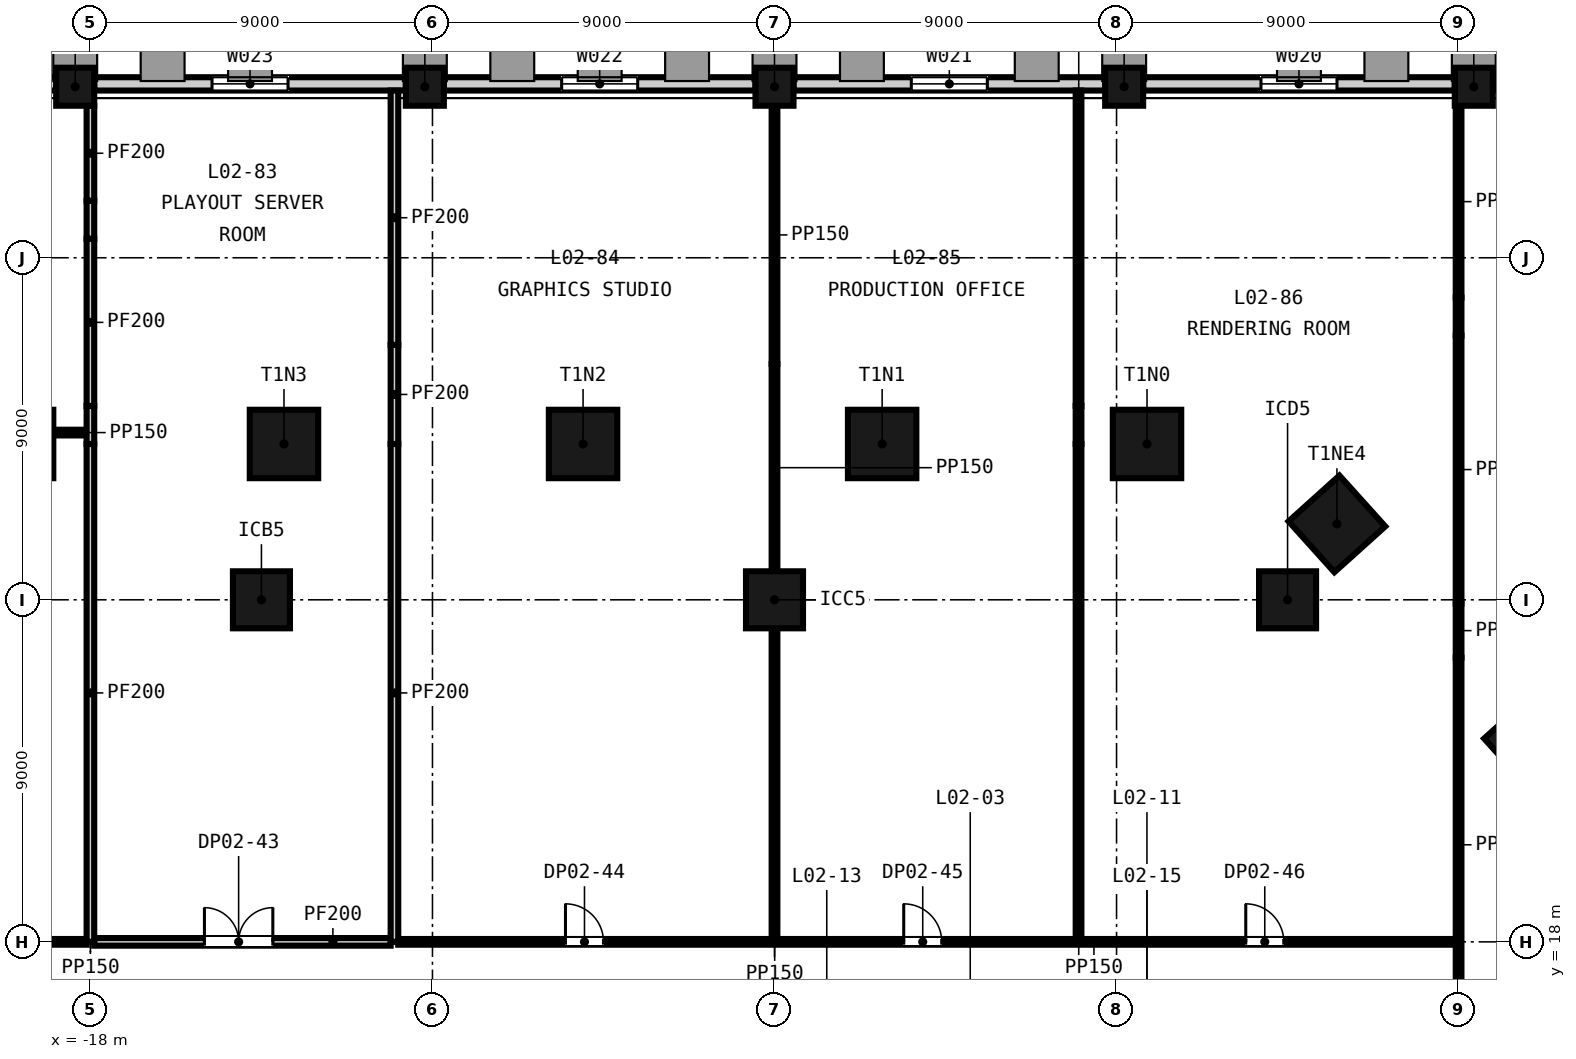
"""IFC4 building model, lengths in metres.
Left out: names, types, materials, properties, quantities, classifications, styles, units other than length and angle.
Written with IfcOpenShell. Run it as: python <this file> out.ifc"""

import sys

from ifc_helpers import new_model, si_unit, direction, frame, frame_2d, origin, origin_2d, place, context, subcontext, project, spatial, rectangle, extrude, element, fill, save


model = new_model("IFC4")
c1 = context("Model", 3, precision=1e-05, world=origin(), true_north=direction((0.0, 1.0)))
c2 = subcontext(c1, "Body", "Model", "MODEL_VIEW")
j1 = project(units=[si_unit("LENGTHUNIT", "METRE"), si_unit("PLANEANGLEUNIT", "RADIAN")], contexts=[c1])
p1 = place(None, origin())
s1 = spatial("IfcSite", under=j1, at=p1, CompositionType="ELEMENT")
p2 = place(p1, origin())
s2 = spatial("IfcBuilding", under=s1, at=p2, CompositionType="ELEMENT")
p3 = place(p2, frame((0.0, 0.0, 18.0)))
s3 = spatial("IfcBuildingStorey", under=s2, at=p3, CompositionType="ELEMENT", Elevation=18.0)
for number, where, z_axis, x_axis in (
    (1, (9.802, 31.1, -0.4), (0.0, 0.0, 1.0), (-1.0, 0.0, 0.0)),
    (2, (2.832, 31.1, -0.4), (0.0, 0.0, 1.0), (-1.0, 0.0, 0.0)),
    (3, (-5.037, 31.1, -0.4), (0.0, 0.0, 1.0), (-1.0, 0.0, 0.0)),
    (4, (-12.907, 31.1, -0.4), (0.0, 0.0, 1.0), (-1.0, 0.0, 0.0)),
    (5, (-19.876, 31.1, -0.4), (0.0, 0.0, 1.0), (-1.0, 0.0, 0.0)),
    (6, (19.944, 23.283, -0.4), (0.0, 0.0, 1.0), (-0.669, 0.743, 0.0)),
    (7, (14.799, 28.998, -0.4), (0.0, 0.0, 1.0), (-0.669, 0.743, 0.0)),
):
    element("IfcColumn", number, at=place(p3, frame(where, z_axis=z_axis, x_axis=x_axis)), inside=s3, PredefinedType="COLUMN", context=c2, shape_type="SweptSolid", body=[
        extrude(rectangle(XDim=1.8, YDim=1.8, at=origin_2d()), origin(), (0.0, 0.0, 1.0), 4.6),
    ])
for number, where, z_axis, x_axis in (
    (8, (-13.5, 27.0, -0.4), (0.0, 0.0, 1.0), (1.0, 0.0, 0.0)),
    (9, (0.0, 27.0, -0.4), (0.0, 0.0, 1.0), (1.0, 0.0, 0.0)),
    (10, (13.5, 27.0, -0.4), (0.0, 0.0, 1.0), (1.0, 0.0, 0.0)),
):
    element("IfcColumn", number, at=place(p3, frame(where, z_axis=z_axis, x_axis=x_axis)), inside=s3, PredefinedType="COLUMN", context=c2, shape_type="SweptSolid", body=[
        extrude(rectangle(XDim=1.5, YDim=1.5, at=origin_2d()), origin(), (0.0, 0.0, 1.0), 4.6),
    ])
for number, where, z_axis, x_axis in (
    (11, (18.4, 40.5, -0.4), (0.0, 0.0, 1.0), (-1.0, 0.0, 0.0)),
    (12, (9.2, 40.5, -0.4), (0.0, 0.0, 1.0), (-1.0, 0.0, 0.0)),
    (13, (0.0, 40.5, -0.4), (0.0, 0.0, 1.0), (-1.0, 0.0, 0.0)),
    (14, (-9.2, 40.5, -0.4), (0.0, 0.0, 1.0), (-1.0, 0.0, 0.0)),
    (15, (-18.4, 40.5, -0.4), (0.0, 0.0, 1.0), (-1.0, 0.0, 0.0)),
):
    element("IfcColumn", number, at=place(p3, frame(where, z_axis=z_axis, x_axis=x_axis)), inside=s3, PredefinedType="COLUMN", context=c2, shape_type="SweptSolid", body=[
        extrude(rectangle(XDim=1.0, YDim=1.0, at=origin_2d()), origin(), (0.0, 0.0, 1.0), 4.6),
    ])
p4 = place(p3, frame((27.1, 40.575, -0.4), z_axis=(0.0, 0.0, 1.0), x_axis=(-1.0, 0.0, 0.0)))
e16 = element("IfcWall", 16, at=p4, inside=s3, PredefinedType="SOLIDWALL", context=c2, shape_type="SweptSolid", body=[
    extrude(rectangle(XDim=8.2, YDim=0.35, at=frame_2d((4.1, 0.0))), origin(), (0.0, 0.0, 1.0), 3.7),
])
p5 = place(p4, frame((3.1, 0.0, 1.3)))
e17 = element("IfcOpeningElement", 17, at=p5, cuts=e16, PredefinedType="OPENING", context=c2, shape_type="SweptSolid", body=[
    extrude(rectangle(XDim=2.0, YDim=2.35, at=frame_2d((1.0, 1.175))), frame((0.0, 0.185, 0.0), z_axis=(0.0, -1.0, 0.0), x_axis=(1.0, 0.0, 0.0)), (0.0, 0.0, 1.0), 0.37),
])
p6 = place(p3, frame((17.9, 40.575, -0.4), z_axis=(0.0, 0.0, 1.0), x_axis=(-1.0, 0.0, 0.0)))
e18 = element("IfcWall", 18, at=p6, inside=s3, PredefinedType="SOLIDWALL", context=c2, shape_type="SweptSolid", body=[
    extrude(rectangle(XDim=8.2, YDim=0.35, at=frame_2d((4.1, 0.0))), origin(), (0.0, 0.0, 1.0), 3.7),
])
p7 = place(p6, frame((3.1, 0.0, 1.3)))
e19 = element("IfcOpeningElement", 19, at=p7, cuts=e18, PredefinedType="OPENING", context=c2, shape_type="SweptSolid", body=[
    extrude(rectangle(XDim=2.0, YDim=2.35, at=frame_2d((1.0, 1.175))), frame((0.0, 0.185, 0.0), z_axis=(0.0, -1.0, 0.0), x_axis=(1.0, 0.0, 0.0)), (0.0, 0.0, 1.0), 0.37),
])
p8 = place(p3, frame((8.7, 40.575, -0.4), z_axis=(0.0, 0.0, 1.0), x_axis=(-1.0, 0.0, 0.0)))
e20 = element("IfcWall", 20, at=p8, inside=s3, PredefinedType="SOLIDWALL", context=c2, shape_type="SweptSolid", body=[
    extrude(rectangle(XDim=8.2, YDim=0.35, at=frame_2d((4.1, 0.0))), origin(), (0.0, 0.0, 1.0), 3.7),
])
p9 = place(p8, frame((3.1, 0.0, 1.3)))
e21 = element("IfcOpeningElement", 21, at=p9, cuts=e20, PredefinedType="OPENING", context=c2, shape_type="SweptSolid", body=[
    extrude(rectangle(XDim=2.0, YDim=2.35, at=frame_2d((1.0, 1.175))), frame((0.0, 0.185, 0.0), z_axis=(0.0, -1.0, 0.0), x_axis=(1.0, 0.0, 0.0)), (0.0, 0.0, 1.0), 0.37),
])
p10 = place(p3, frame((-0.5, 40.575, -0.4), z_axis=(0.0, 0.0, 1.0), x_axis=(-1.0, 0.0, 0.0)))
e22 = element("IfcWall", 22, at=p10, inside=s3, PredefinedType="SOLIDWALL", context=c2, shape_type="SweptSolid", body=[
    extrude(rectangle(XDim=8.2, YDim=0.35, at=frame_2d((4.1, 0.0))), origin(), (0.0, 0.0, 1.0), 3.7),
])
p11 = place(p10, frame((3.1, 0.0, 1.3)))
e23 = element("IfcOpeningElement", 23, at=p11, cuts=e22, PredefinedType="OPENING", context=c2, shape_type="SweptSolid", body=[
    extrude(rectangle(XDim=2.0, YDim=2.35, at=frame_2d((1.0, 1.175))), frame((0.0, 0.185, 0.0), z_axis=(0.0, -1.0, 0.0), x_axis=(1.0, 0.0, 0.0)), (0.0, 0.0, 1.0), 0.37),
])
p12 = place(p3, frame((-9.7, 40.575, -0.4), z_axis=(0.0, 0.0, 1.0), x_axis=(-1.0, 0.0, 0.0)))
e24 = element("IfcWall", 24, at=p12, inside=s3, PredefinedType="SOLIDWALL", context=c2, shape_type="SweptSolid", body=[
    extrude(rectangle(XDim=8.2, YDim=0.35, at=frame_2d((4.1, 0.0))), origin(), (0.0, 0.0, 1.0), 3.7),
])
p13 = place(p12, frame((3.1, 0.0, 1.3)))
e25 = element("IfcOpeningElement", 25, at=p13, cuts=e24, PredefinedType="OPENING", context=c2, shape_type="SweptSolid", body=[
    extrude(rectangle(XDim=2.0, YDim=2.35, at=frame_2d((1.0, 1.175))), frame((0.0, 0.185, 0.0), z_axis=(0.0, -1.0, 0.0), x_axis=(1.0, 0.0, 0.0)), (0.0, 0.0, 1.0), 0.37),
])
p14 = place(p3, frame((-18.9, 40.575, -0.4), z_axis=(0.0, 0.0, 1.0), x_axis=(-1.0, 0.0, 0.0)))
e26 = element("IfcWall", 26, at=p14, inside=s3, PredefinedType="SOLIDWALL", context=c2, shape_type="SweptSolid", body=[
    extrude(rectangle(XDim=8.2, YDim=0.35, at=frame_2d((4.1, 0.0))), origin(), (0.0, 0.0, 1.0), 3.7),
])
p15 = place(p14, frame((3.1, 0.0, 1.3)))
e27 = element("IfcOpeningElement", 27, at=p15, cuts=e26, PredefinedType="OPENING", context=c2, shape_type="SweptSolid", body=[
    extrude(rectangle(XDim=2.0, YDim=2.35, at=frame_2d((1.0, 1.175))), frame((0.0, 0.185, 0.0), z_axis=(0.0, -1.0, 0.0), x_axis=(1.0, 0.0, 0.0)), (0.0, 0.0, 1.0), 0.37),
])
p16 = place(p3, frame((-26.142, 18.0, 0.0), z_axis=(0.0, 0.0, 1.0), x_axis=(1.0, 0.0, 0.0)))
e28 = element("IfcWall", 28, at=p16, inside=s3, PredefinedType="PARTITIONING", context=c2, shape_type="SweptSolid", body=[
    extrude(rectangle(XDim=8.042, YDim=0.15, at=frame_2d((4.021, 0.0))), origin(), (0.0, 0.0, 1.0), 4.2),
])
p17 = place(p3, frame((-17.9, 18.0, 0.0), z_axis=(0.0, 0.0, 1.0), x_axis=(1.0, 0.0, 0.0)))
e29 = element("IfcWall", 29, at=p17, inside=s3, PredefinedType="PARTITIONING", context=c2, shape_type="SweptSolid", body=[
    extrude(rectangle(XDim=7.8, YDim=0.2, at=frame_2d((3.9, 0.0))), origin(), (0.0, 0.0, 1.0), 4.2),
])
p18 = place(p17, frame((2.9, 0.0, 0.0)))
e30 = element("IfcOpeningElement", 30, at=p18, cuts=e29, PredefinedType="OPENING", context=c2, shape_type="SweptSolid", body=[
    extrude(rectangle(XDim=1.8, YDim=2.4, at=frame_2d((0.9, 1.2))), frame((0.0, 0.11, 0.0), z_axis=(0.0, -1.0, 0.0), x_axis=(1.0, 0.0, 0.0)), (0.0, 0.0, 1.0), 0.22),
])
p19 = place(p3, frame((-9.9, 18.0, 0.0), z_axis=(0.0, 0.0, 1.0), x_axis=(1.0, 0.0, 0.0)))
e31 = element("IfcWall", 31, at=p19, inside=s3, PredefinedType="PARTITIONING", context=c2, shape_type="SweptSolid", body=[
    extrude(rectangle(XDim=27.825, YDim=0.15, at=frame_2d((13.913, 0.0))), origin(), (0.0, 0.0, 1.0), 4.2),
])
p20 = place(p19, frame((4.4, 0.0, 0.0)))
e32 = element("IfcOpeningElement", 32, at=p20, cuts=e31, PredefinedType="OPENING", context=c2, shape_type="SweptSolid", body=[
    extrude(rectangle(XDim=1.0, YDim=2.1, at=frame_2d((0.5, 1.05))), frame((0.0, 0.085, 0.0), z_axis=(0.0, -1.0, 0.0), x_axis=(1.0, 0.0, 0.0)), (0.0, 0.0, 1.0), 0.17),
])
p21 = place(p19, frame((13.3, 0.0, 0.0)))
e33 = element("IfcOpeningElement", 33, at=p21, cuts=e31, PredefinedType="OPENING", context=c2, shape_type="SweptSolid", body=[
    extrude(rectangle(XDim=1.0, YDim=2.1, at=frame_2d((0.5, 1.05))), frame((0.0, 0.085, 0.0), z_axis=(0.0, -1.0, 0.0), x_axis=(1.0, 0.0, 0.0)), (0.0, 0.0, 1.0), 0.17),
])
p22 = place(p19, frame((22.3, 0.0, 0.0)))
e34 = element("IfcOpeningElement", 34, at=p22, cuts=e31, PredefinedType="OPENING", context=c2, shape_type="SweptSolid", body=[
    extrude(rectangle(XDim=1.0, YDim=2.1, at=frame_2d((0.5, 1.05))), frame((0.0, 0.085, 0.0), z_axis=(0.0, -1.0, 0.0), x_axis=(1.0, 0.0, 0.0)), (0.0, 0.0, 1.0), 0.17),
])
p23 = place(p3, frame((-18.976, 31.4, 0.0), z_axis=(0.0, 0.0, 1.0), x_axis=(1.0, 0.0, 0.0)))
e35 = element("IfcWall", 35, at=p23, inside=s3, PredefinedType="PARTITIONING", context=c2, shape_type="SweptSolid", body=[
    extrude(rectangle(XDim=0.876, YDim=0.15, at=frame_2d((0.438, 0.0))), origin(), (0.0, 0.0, 1.0), 3.2),
])
p24 = place(p3, frame((-18.0, 18.0, 0.0), z_axis=(0.0, 0.0, 1.0), x_axis=(0.0, 1.0, 0.0)))
e36 = element("IfcWall", 36, at=p24, inside=s3, PredefinedType="PARTITIONING", context=c2, shape_type="SweptSolid", body=[
    extrude(rectangle(XDim=13.1, YDim=0.2, at=frame_2d((6.55, 0.0))), origin(), (0.0, 0.0, 1.0), 4.2),
])
p25 = place(p3, frame((-18.0, 31.1, 0.0), z_axis=(0.0, 0.0, 1.0), x_axis=(0.0, 1.0, 0.0)))
e37 = element("IfcWall", 37, at=p25, inside=s3, PredefinedType="PARTITIONING", context=c2, shape_type="SweptSolid", body=[
    extrude(rectangle(XDim=1.0, YDim=0.2, at=frame_2d((0.5, 0.0))), origin(), (0.0, 0.0, 1.0), 3.2),
])
p26 = place(p3, frame((-18.0, 32.1, 0.0), z_axis=(0.0, 0.0, 1.0), x_axis=(0.0, 1.0, 0.0)))
e38 = element("IfcWall", 38, at=p26, inside=s3, PredefinedType="PARTITIONING", context=c2, shape_type="SweptSolid", body=[
    extrude(rectangle(XDim=4.4, YDim=0.2, at=frame_2d((2.2, 0.0))), origin(), (0.0, 0.0, 1.0), 4.2),
])
p27 = place(p3, frame((-18.0, 36.5, 0.0), z_axis=(0.0, 0.0, 1.0), x_axis=(0.0, 1.0, 0.0)))
e39 = element("IfcWall", 39, at=p27, inside=s3, PredefinedType="PARTITIONING", context=c2, shape_type="SweptSolid", body=[
    extrude(rectangle(XDim=1.0, YDim=0.2, at=frame_2d((0.5, 0.0))), origin(), (0.0, 0.0, 1.0), 3.597),
])
p28 = place(p3, frame((-18.0, 37.5, 0.0), z_axis=(0.0, 0.0, 1.0), x_axis=(0.0, 1.0, 0.0)))
e40 = element("IfcWall", 40, at=p28, inside=s3, PredefinedType="PARTITIONING", context=c2, shape_type="SweptSolid", body=[
    extrude(rectangle(XDim=2.5, YDim=0.2, at=frame_2d((1.25, 0.0))), origin(), (0.0, 0.0, 1.0), 4.2),
])
p29 = place(p3, frame((-10.0, 18.0, 0.0), z_axis=(0.0, 0.0, 1.0), x_axis=(0.0, 1.0, 0.0)))
e41 = element("IfcWall", 41, at=p29, inside=s3, PredefinedType="PARTITIONING", context=c2, shape_type="SweptSolid", body=[
    extrude(rectangle(XDim=13.1, YDim=0.2, at=frame_2d((6.55, 0.0))), origin(), (0.0, 0.0, 1.0), 4.2),
])
p30 = place(p3, frame((-10.0, 31.1, 0.0), z_axis=(0.0, 0.0, 1.0), x_axis=(0.0, 1.0, 0.0)))
e42 = element("IfcWall", 42, at=p30, inside=s3, PredefinedType="PARTITIONING", context=c2, shape_type="SweptSolid", body=[
    extrude(rectangle(XDim=2.606, YDim=0.2, at=frame_2d((1.303, 0.0))), origin(), (0.0, 0.0, 1.0), 3.2),
])
p31 = place(p3, frame((-10.0, 33.707, 0.0), z_axis=(0.0, 0.0, 1.0), x_axis=(0.0, 1.0, 0.0)))
e43 = element("IfcWall", 43, at=p31, inside=s3, PredefinedType="PARTITIONING", context=c2, shape_type="SweptSolid", body=[
    extrude(rectangle(XDim=6.693, YDim=0.2, at=frame_2d((3.347, 0.0))), origin(), (0.0, 0.0, 1.0), 4.2),
])
p32 = place(p3, frame((0.0, 18.075, 0.0), z_axis=(0.0, 0.0, 1.0), x_axis=(0.0, 1.0, 0.0)))
e44 = element("IfcWall", 44, at=p32, inside=s3, PredefinedType="PARTITIONING", context=c2, shape_type="SweptSolid", body=[
    extrude(rectangle(XDim=8.175, YDim=0.15, at=frame_2d((4.087, 0.0))), origin(), (0.0, 0.0, 1.0), 3.521),
])
p33 = place(p3, frame((0.0, 27.75, 0.0), z_axis=(0.0, 0.0, 1.0), x_axis=(0.0, 1.0, 0.0)))
e45 = element("IfcWall", 45, at=p33, inside=s3, PredefinedType="PARTITIONING", context=c2, shape_type="SweptSolid", body=[
    extrude(rectangle(XDim=5.453, YDim=0.15, at=frame_2d((2.727, 0.0))), origin(), (0.0, 0.0, 1.0), 3.2),
])
p34 = place(p3, frame((0.0, 33.203, 0.0), z_axis=(0.0, 0.0, 1.0), x_axis=(0.0, 1.0, 0.0)))
e46 = element("IfcWall", 46, at=p34, inside=s3, PredefinedType="PARTITIONING", context=c2, shape_type="SweptSolid", body=[
    extrude(rectangle(XDim=6.797, YDim=0.15, at=frame_2d((3.398, 0.0))), origin(), (0.0, 0.0, 1.0), 4.2),
])
p35 = place(p3, frame((8.0, 18.075, 0.0), z_axis=(0.0, 0.0, 1.0), x_axis=(0.0, 1.0, 0.0)))
e47 = element("IfcWall", 47, at=p35, inside=s3, PredefinedType="PARTITIONING", context=c2, shape_type="SweptSolid", body=[
    extrude(rectangle(XDim=13.025, YDim=0.15, at=frame_2d((6.513, 0.0))), origin(), (0.0, 0.0, 1.0), 4.2),
])
p36 = place(p3, frame((8.0, 31.1, 0.0), z_axis=(0.0, 0.0, 1.0), x_axis=(0.0, 1.0, 0.0)))
e48 = element("IfcWall", 48, at=p36, inside=s3, PredefinedType="PARTITIONING", context=c2, shape_type="SweptSolid", body=[
    extrude(rectangle(XDim=1.0, YDim=0.15, at=frame_2d((0.5, 0.0))), origin(), (0.0, 0.0, 1.0), 3.2),
])
p37 = place(p3, frame((8.0, 32.1, 0.0), z_axis=(0.0, 0.0, 1.0), x_axis=(0.0, 1.0, 0.0)))
e49 = element("IfcWall", 49, at=p37, inside=s3, PredefinedType="PARTITIONING", context=c2, shape_type="SweptSolid", body=[
    extrude(rectangle(XDim=8.3, YDim=0.15, at=frame_2d((4.15, 0.0))), origin(), (0.0, 0.0, 1.0), 4.2),
])
p38 = place(p3, frame((18.0, 15.629, 0.0), z_axis=(0.0, 0.0, 1.0), x_axis=(0.0, 1.0, 0.0)))
e50 = element("IfcWall", 50, at=p38, inside=s3, PredefinedType="PARTITIONING", context=c2, shape_type="SweptSolid", body=[
    extrude(rectangle(XDim=9.85, YDim=0.15, at=frame_2d((4.925, 0.0))), origin(), (0.0, 0.0, 1.0), 4.2),
])
p39 = place(p3, frame((18.0, 25.479, 0.0), z_axis=(0.0, 0.0, 1.0), x_axis=(0.0, 1.0, 0.0)))
e51 = element("IfcWall", 51, at=p39, inside=s3, PredefinedType="PARTITIONING", context=c2, shape_type="SweptSolid", body=[
    extrude(rectangle(XDim=1.42, YDim=0.15, at=frame_2d((0.71, 0.0))), origin(), (0.0, 0.0, 1.0), 3.2),
])
p40 = place(p3, frame((18.0, 26.899, 0.0), z_axis=(0.0, 0.0, 1.0), x_axis=(0.0, 1.0, 0.0)))
e52 = element("IfcWall", 52, at=p40, inside=s3, PredefinedType="PARTITIONING", context=c2, shape_type="SweptSolid", body=[
    extrude(rectangle(XDim=7.055, YDim=0.15, at=frame_2d((3.528, 0.0))), origin(), (0.0, 0.0, 1.0), 4.2),
])
p41 = place(p3, frame((18.0, 33.955, 0.0), z_axis=(0.0, 0.0, 1.0), x_axis=(0.0, 1.0, 0.0)))
e53 = element("IfcWall", 53, at=p41, inside=s3, PredefinedType="PARTITIONING", context=c2, shape_type="SweptSolid", body=[
    extrude(rectangle(XDim=1.0, YDim=0.15, at=frame_2d((0.5, 0.0))), origin(), (0.0, 0.0, 1.0), 3.451),
])
p42 = place(p3, frame((18.0, 34.955, 0.0), z_axis=(0.0, 0.0, 1.0), x_axis=(0.0, 1.0, 0.0)))
e54 = element("IfcWall", 54, at=p42, inside=s3, PredefinedType="PARTITIONING", context=c2, shape_type="SweptSolid", body=[
    extrude(rectangle(XDim=5.045, YDim=0.15, at=frame_2d((2.523, 0.0))), origin(), (0.0, 0.0, 1.0), 4.2),
])
p43 = place(p7, origin())
e55 = element("IfcWindow", 55, at=p43, inside=s3, PartitioningType="SINGLE_PANEL", PredefinedType="WINDOW", context=c2, shape_type="SweptSolid", body=[
    extrude(rectangle(XDim=2.0, YDim=2.35, at=frame_2d((1.0, 1.175))), frame((0.0, 0.03, 0.0), z_axis=(0.0, -1.0, 0.0), x_axis=(1.0, 0.0, 0.0)), (0.0, 0.0, 1.0), 0.06),
])
fill(e19, e55)
p44 = place(p9, origin())
e56 = element("IfcWindow", 56, at=p44, inside=s3, PartitioningType="SINGLE_PANEL", PredefinedType="WINDOW", context=c2, shape_type="SweptSolid", body=[
    extrude(rectangle(XDim=2.0, YDim=2.35, at=frame_2d((1.0, 1.175))), frame((0.0, 0.03, 0.0), z_axis=(0.0, -1.0, 0.0), x_axis=(1.0, 0.0, 0.0)), (0.0, 0.0, 1.0), 0.06),
])
fill(e21, e56)
p45 = place(p11, origin())
e57 = element("IfcWindow", 57, at=p45, inside=s3, PartitioningType="SINGLE_PANEL", PredefinedType="WINDOW", context=c2, shape_type="SweptSolid", body=[
    extrude(rectangle(XDim=2.0, YDim=2.35, at=frame_2d((1.0, 1.175))), frame((0.0, 0.03, 0.0), z_axis=(0.0, -1.0, 0.0), x_axis=(1.0, 0.0, 0.0)), (0.0, 0.0, 1.0), 0.06),
])
fill(e23, e57)
p46 = place(p13, origin())
e58 = element("IfcWindow", 58, at=p46, inside=s3, PartitioningType="SINGLE_PANEL", PredefinedType="WINDOW", context=c2, shape_type="SweptSolid", body=[
    extrude(rectangle(XDim=2.0, YDim=2.35, at=frame_2d((1.0, 1.175))), frame((0.0, 0.03, 0.0), z_axis=(0.0, -1.0, 0.0), x_axis=(1.0, 0.0, 0.0)), (0.0, 0.0, 1.0), 0.06),
])
fill(e25, e58)
p47 = place(p18, origin())
e59 = element("IfcDoor", 59, at=p47, inside=s3, OperationType="SINGLE_SWING_LEFT", PredefinedType="DOOR", context=c2, shape_type="SweptSolid", body=[
    extrude(rectangle(XDim=1.8, YDim=2.4, at=frame_2d((0.9, 1.2))), frame((0.0, 0.025, 0.0), z_axis=(0.0, -1.0, 0.0), x_axis=(1.0, 0.0, 0.0)), (0.0, 0.0, 1.0), 0.05),
])
fill(e30, e59)
p48 = place(p20, origin())
e60 = element("IfcDoor", 60, at=p48, inside=s3, OperationType="SINGLE_SWING_LEFT", PredefinedType="DOOR", context=c2, shape_type="SweptSolid", body=[
    extrude(rectangle(XDim=1.0, YDim=2.1, at=frame_2d((0.5, 1.05))), frame((0.0, 0.025, 0.0), z_axis=(0.0, -1.0, 0.0), x_axis=(1.0, 0.0, 0.0)), (0.0, 0.0, 1.0), 0.05),
])
fill(e32, e60)
p49 = place(p21, origin())
e61 = element("IfcDoor", 61, at=p49, inside=s3, OperationType="SINGLE_SWING_LEFT", PredefinedType="DOOR", context=c2, shape_type="SweptSolid", body=[
    extrude(rectangle(XDim=1.0, YDim=2.1, at=frame_2d((0.5, 1.05))), frame((0.0, 0.025, 0.0), z_axis=(0.0, -1.0, 0.0), x_axis=(1.0, 0.0, 0.0)), (0.0, 0.0, 1.0), 0.05),
])
fill(e33, e61)
p50 = place(p22, origin())
e62 = element("IfcDoor", 62, at=p50, inside=s3, OperationType="SINGLE_SWING_LEFT", PredefinedType="DOOR", context=c2, shape_type="SweptSolid", body=[
    extrude(rectangle(XDim=1.0, YDim=2.1, at=frame_2d((0.5, 1.05))), frame((0.0, 0.025, 0.0), z_axis=(0.0, -1.0, 0.0), x_axis=(1.0, 0.0, 0.0)), (0.0, 0.0, 1.0), 0.05),
])
fill(e34, e62)
save(model, sys.argv[1])
